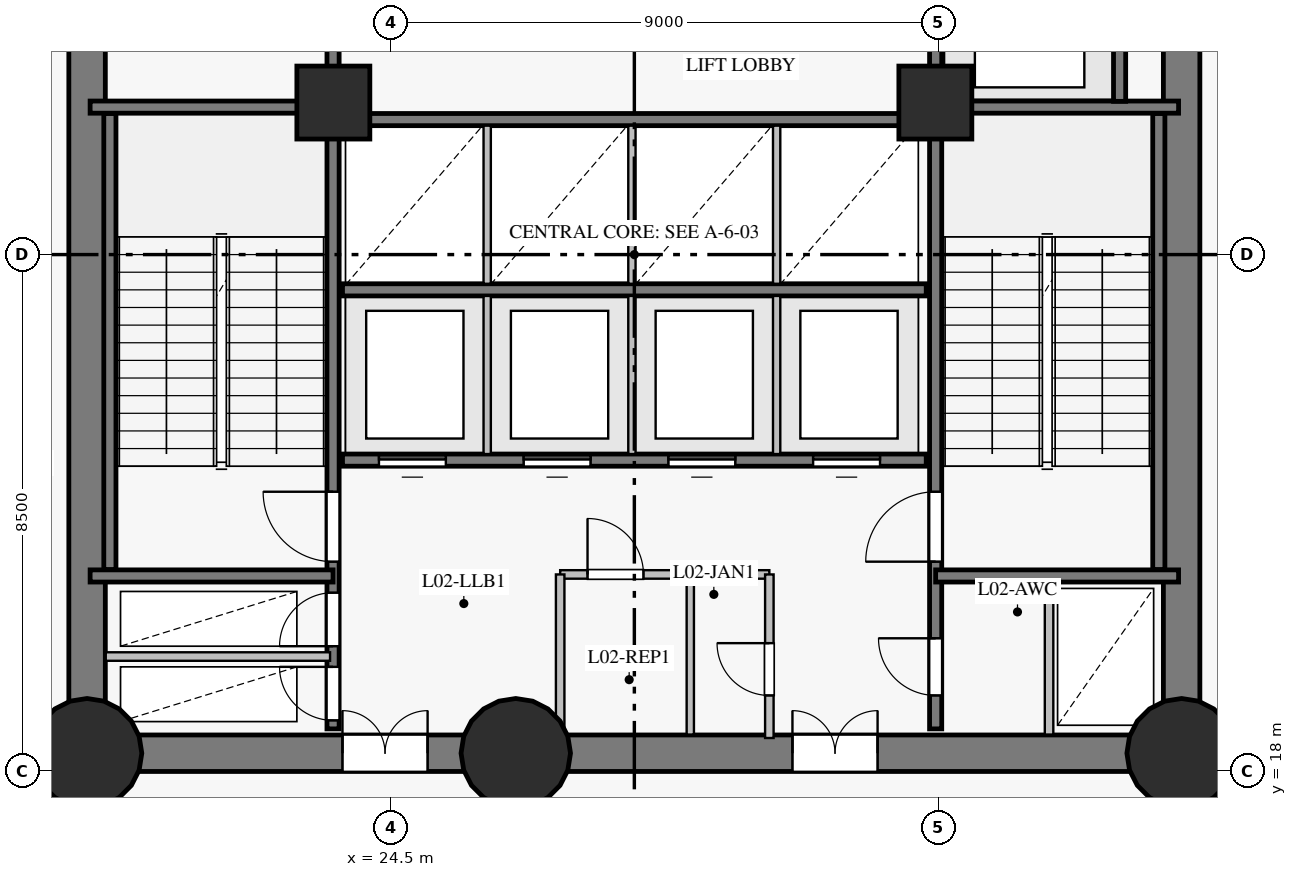
"""IFC4 building model, lengths in metres.
Left out: names, types, materials, properties, quantities, classifications, styles, units other than length and angle.
Written with IfcOpenShell. Run it as: python <this file> out.ifc"""

import sys

from ifc_helpers import new_model, si_unit, direction, frame, frame_2d, origin, origin_with_axes, origin_2d, place, context, subcontext, project, spatial, rectangle, circle, extrude, source, transform, mapped, element, fill, save


model = new_model("IFC4")
c1 = context("Model", 3, precision=1e-05, world=origin(), true_north=direction((0.0, 1.0)))
c2 = subcontext(c1, "Body", "Model", "MODEL_VIEW")
j1 = project(units=[si_unit("LENGTHUNIT", "METRE"), si_unit("PLANEANGLEUNIT", "RADIAN")], contexts=[c1])
p1 = place(None, origin())
s1 = spatial("IfcSite", under=j1, at=p1, CompositionType="ELEMENT")
p2 = place(p1, origin())
s2 = spatial("IfcBuilding", under=s1, at=p2, CompositionType="ELEMENT")
p3 = place(p2, frame((0.0, 0.0, 9.0)))
s3 = spatial("IfcBuildingStorey", under=s2, at=p3, CompositionType="ELEMENT", Elevation=9.0)
p4 = place(p3, frame((19.5, 18.3, 0.0), z_axis=(0.0, 0.0, 1.0), x_axis=(1.0, 0.0, 0.0)))
e1 = element("IfcWall", 1, at=p4, inside=s3, PredefinedType="SHEAR", context=c2, shape_type="SweptSolid", body=[
    extrude(rectangle(XDim=7.05, YDim=0.6, at=frame_2d((3.525, 0.0))), origin(), (0.0, 0.0, 1.0), 4.2),
])
p5 = place(p4, frame((4.2, 0.0, 0.0)))
e2 = element("IfcOpeningElement", 2, at=p5, cuts=e1, PredefinedType="OPENING", context=c2, shape_type="SweptSolid", body=[
    extrude(rectangle(XDim=1.4, YDim=2.2, at=frame_2d((0.7, 1.1))), frame((0.0, 0.31, 0.0), z_axis=(0.0, -1.0, 0.0), x_axis=(1.0, 0.0, 0.0)), (0.0, 0.0, 1.0), 0.62),
])
p6 = place(p3, frame((26.55, 18.3, 0.0), z_axis=(0.0, 0.0, 1.0), x_axis=(1.0, 0.0, 0.0)))
e3 = element("IfcWall", 3, at=p6, inside=s3, PredefinedType="SHEAR", context=c2, shape_type="SweptSolid", body=[
    extrude(rectangle(XDim=10.95, YDim=0.6, at=frame_2d((5.475, 0.0))), origin(), (0.0, 0.0, 1.0), 4.2),
])
p7 = place(p6, frame((4.55, 0.0, 0.0)))
e4 = element("IfcOpeningElement", 4, at=p7, cuts=e3, PredefinedType="OPENING", context=c2, shape_type="SweptSolid", body=[
    extrude(rectangle(XDim=1.4, YDim=2.2, at=frame_2d((0.7, 1.1))), frame((0.0, 0.31, 0.0), z_axis=(0.0, -1.0, 0.0), x_axis=(1.0, 0.0, 0.0)), (0.0, 0.0, 1.0), 0.62),
])
p8 = place(p3, frame((37.5, 18.3, 0.0), z_axis=(0.0, 0.0, 1.0), x_axis=(0.0, 1.0, 0.0)))
e5 = element("IfcWall", 5, at=p8, inside=s3, PredefinedType="SHEAR", context=c2, shape_type="SweptSolid", body=[
    extrude(rectangle(XDim=16.4, YDim=0.6, at=frame_2d((8.2, 0.0))), origin(), (0.0, 0.0, 1.0), 4.2),
])
p9 = place(p8, frame((13.96, 0.0, 0.0)))
e6 = element("IfcOpeningElement", 6, at=p9, cuts=e5, PredefinedType="OPENING", context=c2, shape_type="SweptSolid", body=[
    extrude(rectangle(XDim=1.2, YDim=2.15, at=frame_2d((0.6, 1.075))), frame((0.0, 0.31, 0.0), z_axis=(0.0, -1.0, 0.0), x_axis=(1.0, 0.0, 0.0)), (0.0, 0.0, 1.0), 0.62),
])
p10 = place(p3, frame((19.5, 34.7, 0.0), z_axis=(0.0, 0.0, 1.0), x_axis=(0.0, -1.0, 0.0)))
e7 = element("IfcWall", 7, at=p10, inside=s3, PredefinedType="SHEAR", context=c2, shape_type="SweptSolid", body=[
    extrude(rectangle(XDim=16.4, YDim=0.6, at=frame_2d((8.2, 0.0))), origin(), (0.0, 0.0, 1.0), 4.2),
])
p11 = place(p10, frame((3.1, 0.0, 0.0)))
e8 = element("IfcOpeningElement", 8, at=p11, cuts=e7, PredefinedType="OPENING", context=c2, shape_type="SweptSolid", body=[
    extrude(rectangle(XDim=1.1, YDim=2.15, at=frame_2d((0.55, 1.075))), frame((0.0, 0.31, 0.0), z_axis=(0.0, -1.0, 0.0), x_axis=(1.0, 0.0, 0.0)), (0.0, 0.0, 1.0), 0.62),
])
m1 = source(origin_with_axes(), c2, "Body", "SweptSolid", [
    extrude(circle(Radius=0.9, at=origin_2d()), origin(), (0.0, 0.0, 1.0), 4.5),
])
for number, where, z_axis, x_axis in (
    (9, (19.5, 18.3, 0.0), (0.0, 0.0, 1.0), (1.0, 0.0, 0.0)),
    (10, (26.55, 18.3, 0.0), (0.0, 0.0, 1.0), (1.0, 0.0, 0.0)),
    (11, (37.5, 18.3, 0.0), (0.0, 0.0, 1.0), (1.0, 0.0, 0.0)),
):
    element("IfcColumn", number, at=place(p3, frame(where, z_axis=z_axis, x_axis=x_axis)), inside=s3, PredefinedType="COLUMN", context=c2, shape_type="MappedRepresentation", body=[
        mapped(m1, transform((0.0, 0.0, 0.0), scale=1.0)),
    ])
m2 = source(origin_with_axes(), c2, "Body", "SweptSolid", [
    extrude(rectangle(XDim=1.2, YDim=1.2, at=origin_2d()), origin(), (0.0, 0.0, 1.0), 4.5),
])
for number, where, z_axis, x_axis in (
    (12, (23.55, 29.0, 0.0), (0.0, 0.0, 1.0), (1.0, 0.0, 0.0)),
    (13, (33.45, 29.0, 0.0), (0.0, 0.0, 1.0), (1.0, 0.0, 0.0)),
):
    element("IfcColumn", number, at=place(p3, frame(where, z_axis=z_axis, x_axis=x_axis)), inside=s3, PredefinedType="COLUMN", context=c2, shape_type="MappedRepresentation", body=[
        mapped(m2, transform((0.0, 0.0, 0.0), scale=1.0)),
    ])
p12 = place(p3, frame((23.545, 18.7, 0.0), z_axis=(0.0, 0.0, 1.0), x_axis=(0.0, 1.0, 0.0)))
e14 = element("IfcWall", 14, at=p12, inside=s3, PredefinedType="SHEAR", context=c2, shape_type="SweptSolid", body=[
    extrude(rectangle(XDim=15.6, YDim=0.2, at=frame_2d((7.8, 0.0))), origin(), (0.0, 0.0, 1.0), 4.2),
])
p13 = place(p12, frame((2.75, 0.0, 0.0)))
e15 = element("IfcOpeningElement", 15, at=p13, cuts=e14, PredefinedType="OPENING", context=c2, shape_type="SweptSolid", body=[
    extrude(rectangle(XDim=1.15, YDim=2.15, at=frame_2d((0.575, 1.075))), frame((0.0, 0.11, 0.0), z_axis=(0.0, -1.0, 0.0), x_axis=(1.0, 0.0, 0.0)), (0.0, 0.0, 1.0), 0.22),
])
p14 = place(p12, frame((0.14, 0.0, 0.0)))
e16 = element("IfcOpeningElement", 16, at=p14, cuts=e14, PredefinedType="OPENING", context=c2, shape_type="SweptSolid", body=[
    extrude(rectangle(XDim=0.88, YDim=2.1, at=frame_2d((0.44, 1.05))), frame((0.0, 0.11, 0.0), z_axis=(0.0, -1.0, 0.0), x_axis=(1.0, 0.0, 0.0)), (0.0, 0.0, 1.0), 0.22),
])
p15 = place(p12, frame((1.36, 0.0, 0.0)))
e17 = element("IfcOpeningElement", 17, at=p15, cuts=e14, PredefinedType="OPENING", context=c2, shape_type="SweptSolid", body=[
    extrude(rectangle(XDim=0.88, YDim=2.1, at=frame_2d((0.44, 1.05))), frame((0.0, 0.11, 0.0), z_axis=(0.0, -1.0, 0.0), x_axis=(1.0, 0.0, 0.0)), (0.0, 0.0, 1.0), 0.22),
])
p16 = place(p12, frame((12.1, 0.0, 0.0)))
e18 = element("IfcOpeningElement", 18, at=p16, cuts=e14, PredefinedType="OPENING", context=c2, shape_type="SweptSolid", body=[
    extrude(rectangle(XDim=1.12, YDim=2.15, at=frame_2d((0.56, 1.075))), frame((0.0, 0.11, 0.0), z_axis=(0.0, -1.0, 0.0), x_axis=(1.0, 0.0, 0.0)), (0.0, 0.0, 1.0), 0.22),
])
p17 = place(p12, frame((14.05, 0.0, 0.0)))
e19 = element("IfcOpeningElement", 19, at=p17, cuts=e14, PredefinedType="OPENING", context=c2, shape_type="SweptSolid", body=[
    extrude(rectangle(XDim=1.12, YDim=2.15, at=frame_2d((0.56, 1.075))), frame((0.0, 0.11, 0.0), z_axis=(0.0, -1.0, 0.0), x_axis=(1.0, 0.0, 0.0)), (0.0, 0.0, 1.0), 0.22),
])
p18 = place(p3, frame((33.455, 18.7, 0.0), z_axis=(0.0, 0.0, 1.0), x_axis=(0.0, 1.0, 0.0)))
e20 = element("IfcWall", 20, at=p18, inside=s3, PredefinedType="SHEAR", context=c2, shape_type="SweptSolid", body=[
    extrude(rectangle(XDim=15.6, YDim=0.2, at=frame_2d((7.8, 0.0))), origin(), (0.0, 0.0, 1.0), 4.2),
])
p19 = place(p18, frame((2.75, 0.0, 0.0)))
e21 = element("IfcOpeningElement", 21, at=p19, cuts=e20, PredefinedType="OPENING", context=c2, shape_type="SweptSolid", body=[
    extrude(rectangle(XDim=1.15, YDim=2.15, at=frame_2d((0.575, 1.075))), frame((0.0, 0.11, 0.0), z_axis=(0.0, -1.0, 0.0), x_axis=(1.0, 0.0, 0.0)), (0.0, 0.0, 1.0), 0.22),
])
p20 = place(p18, frame((0.55, 0.0, 0.0)))
e22 = element("IfcOpeningElement", 22, at=p20, cuts=e20, PredefinedType="OPENING", context=c2, shape_type="SweptSolid", body=[
    extrude(rectangle(XDim=0.94, YDim=2.1, at=frame_2d((0.47, 1.05))), frame((0.0, 0.11, 0.0), z_axis=(0.0, -1.0, 0.0), x_axis=(1.0, 0.0, 0.0)), (0.0, 0.0, 1.0), 0.22),
])
p21 = place(p3, frame((23.7, 23.12, 0.0), z_axis=(0.0, 0.0, 1.0), x_axis=(1.0, 0.0, 0.0)))
e23 = element("IfcWall", 23, at=p21, inside=s3, PredefinedType="SHEAR", context=c2, shape_type="SweptSolid", body=[
    extrude(rectangle(XDim=9.6, YDim=0.2, at=frame_2d((4.8, 0.0))), origin(), (0.0, 0.0, 1.0), 4.2),
])
p22 = place(p21, frame((0.6, 0.0, 0.0)))
e24 = element("IfcOpeningElement", 24, at=p22, cuts=e23, PredefinedType="OPENING", context=c2, shape_type="SweptSolid", body=[
    extrude(rectangle(XDim=1.1, YDim=2.15, at=frame_2d((0.55, 1.075))), frame((0.0, 0.11, 0.0), z_axis=(0.0, -1.0, 0.0), x_axis=(1.0, 0.0, 0.0)), (0.0, 0.0, 1.0), 0.22),
])
p23 = place(p21, frame((2.98, 0.0, 0.0)))
e25 = element("IfcOpeningElement", 25, at=p23, cuts=e23, PredefinedType="OPENING", context=c2, shape_type="SweptSolid", body=[
    extrude(rectangle(XDim=1.1, YDim=2.15, at=frame_2d((0.55, 1.075))), frame((0.0, 0.11, 0.0), z_axis=(0.0, -1.0, 0.0), x_axis=(1.0, 0.0, 0.0)), (0.0, 0.0, 1.0), 0.22),
])
p24 = place(p21, frame((5.36, 0.0, 0.0)))
e26 = element("IfcOpeningElement", 26, at=p24, cuts=e23, PredefinedType="OPENING", context=c2, shape_type="SweptSolid", body=[
    extrude(rectangle(XDim=1.1, YDim=2.15, at=frame_2d((0.55, 1.075))), frame((0.0, 0.11, 0.0), z_axis=(0.0, -1.0, 0.0), x_axis=(1.0, 0.0, 0.0)), (0.0, 0.0, 1.0), 0.22),
])
p25 = place(p21, frame((7.74, 0.0, 0.0)))
e27 = element("IfcOpeningElement", 27, at=p25, cuts=e23, PredefinedType="OPENING", context=c2, shape_type="SweptSolid", body=[
    extrude(rectangle(XDim=1.1, YDim=2.15, at=frame_2d((0.55, 1.075))), frame((0.0, 0.11, 0.0), z_axis=(0.0, -1.0, 0.0), x_axis=(1.0, 0.0, 0.0)), (0.0, 0.0, 1.0), 0.22),
])
for number, where, z_axis, x_axis in (
    (28, (23.7, 25.92, 0.0), (0.0, 0.0, 1.0), (1.0, 0.0, 0.0)),
    (29, (23.7, 28.72, 0.0), (0.0, 0.0, 1.0), (1.0, 0.0, 0.0)),
):
    element("IfcWall", number, at=place(p3, frame(where, z_axis=z_axis, x_axis=x_axis)), inside=s3, PredefinedType="SHEAR", context=c2, shape_type="SweptSolid", body=[
        extrude(rectangle(XDim=9.6, YDim=0.2, at=frame_2d((4.8, 0.0))), origin(), (0.0, 0.0, 1.0), 4.2),
    ])
for number, where, z_axis, x_axis in (
    (30, (19.875, 21.32, 0.0), (0.0, 0.0, 1.0), (0.0, 1.0, 0.0)),
    (31, (37.125, 21.32, 0.0), (0.0, 0.0, 1.0), (0.0, 1.0, 0.0)),
):
    element("IfcWall", number, at=place(p3, frame(where, z_axis=z_axis, x_axis=x_axis)), inside=s3, PredefinedType="SHEAR", context=c2, shape_type="SweptSolid", body=[
        extrude(rectangle(XDim=7.5, YDim=0.2, at=frame_2d((3.75, 0.0))), origin(), (0.0, 0.0, 1.0), 4.2),
    ])
for number, where, z_axis, x_axis in (
    (32, (33.455, 21.215, 0.0), (0.0, 0.0, 1.0), (1.0, 0.0, 0.0)),
    (33, (33.455, 28.925, 0.0), (0.0, 0.0, 1.0), (1.0, 0.0, 0.0)),
    (34, (19.55, 21.215, 0.0), (0.0, 0.0, 1.0), (1.0, 0.0, 0.0)),
    (35, (19.55, 28.925, 0.0), (0.0, 0.0, 1.0), (1.0, 0.0, 0.0)),
):
    element("IfcWall", number, at=place(p3, frame(where, z_axis=z_axis, x_axis=x_axis)), inside=s3, PredefinedType="SHEAR", context=c2, shape_type="SweptSolid", body=[
        extrude(rectangle(XDim=3.995, YDim=0.2, at=frame_2d((1.998, 0.0))), origin(), (0.0, 0.0, 1.0), 4.2),
    ])
p26 = place(p3, frame((36.48, 29.02, 0.0), z_axis=(0.0, 0.0, 1.0), x_axis=(0.0, 1.0, 0.0)))
e36 = element("IfcWall", 36, at=p26, inside=s3, PredefinedType="SHEAR", context=c2, shape_type="SweptSolid", body=[
    extrude(rectangle(XDim=2.86, YDim=0.2, at=frame_2d((1.43, 0.0))), origin(), (0.0, 0.0, 1.0), 4.2),
])
p27 = place(p3, frame((19.807, 19.89, 0.0), z_axis=(0.0, 0.0, 1.0), x_axis=(1.0, 0.0, 0.0)))
e37 = element("IfcWall", 37, at=p27, inside=s3, PredefinedType="PARTITIONING", context=c2, shape_type="SweptSolid", body=[
    extrude(rectangle(XDim=3.689, YDim=0.14, at=frame_2d((1.844, 0.0))), origin(), (0.0, 0.0, 1.0), 4.2),
])
p28 = place(p3, frame((27.28, 21.24, 0.0), z_axis=(0.0, 0.0, 1.0), x_axis=(1.0, 0.0, 0.0)))
e38 = element("IfcWall", 38, at=p28, inside=s3, PredefinedType="PARTITIONING", context=c2, shape_type="SweptSolid", body=[
    extrude(rectangle(XDim=3.44, YDim=0.14, at=frame_2d((1.72, 0.0))), origin(), (0.0, 0.0, 1.0), 4.2),
])
p29 = place(p28, frame((0.45, 0.0, 0.0)))
e39 = element("IfcOpeningElement", 39, at=p29, cuts=e38, PredefinedType="OPENING", context=c2, shape_type="SweptSolid", body=[
    extrude(rectangle(XDim=0.92, YDim=2.1, at=frame_2d((0.46, 1.05))), frame((0.0, 0.08, 0.0), z_axis=(0.0, -1.0, 0.0), x_axis=(1.0, 0.0, 0.0)), (0.0, 0.0, 1.0), 0.16),
])
p30 = place(p3, frame((27.28, 18.55, 0.0), z_axis=(0.0, 0.0, 1.0), x_axis=(0.0, 1.0, 0.0)))
e40 = element("IfcWall", 40, at=p30, inside=s3, PredefinedType="PARTITIONING", context=c2, shape_type="SweptSolid", body=[
    extrude(rectangle(XDim=2.69, YDim=0.14, at=frame_2d((1.345, 0.0))), origin(), (0.0, 0.0, 1.0), 4.2),
])
p31 = place(p3, frame((30.72, 18.55, 0.0), z_axis=(0.0, 0.0, 1.0), x_axis=(0.0, 1.0, 0.0)))
e41 = element("IfcWall", 41, at=p31, inside=s3, PredefinedType="PARTITIONING", context=c2, shape_type="SweptSolid", body=[
    extrude(rectangle(XDim=2.69, YDim=0.14, at=frame_2d((1.345, 0.0))), origin(), (0.0, 0.0, 1.0), 4.2),
])
p32 = place(p31, frame((0.7, 0.0, 0.0)))
e42 = element("IfcOpeningElement", 42, at=p32, cuts=e41, PredefinedType="OPENING", context=c2, shape_type="SweptSolid", body=[
    extrude(rectangle(XDim=0.86, YDim=2.1, at=frame_2d((0.43, 1.05))), frame((0.0, 0.08, 0.0), z_axis=(0.0, -1.0, 0.0), x_axis=(1.0, 0.0, 0.0)), (0.0, 0.0, 1.0), 0.16),
])
for number, where, z_axis, x_axis in (
    (43, (26.08, 23.22, 0.0), (0.0, 0.0, 1.0), (0.0, 1.0, 0.0)),
    (44, (28.46, 23.22, 0.0), (0.0, 0.0, 1.0), (0.0, 1.0, 0.0)),
    (45, (30.84, 23.22, 0.0), (0.0, 0.0, 1.0), (0.0, 1.0, 0.0)),
    (46, (26.08, 26.02, 0.0), (0.0, 0.0, 1.0), (0.0, 1.0, 0.0)),
    (47, (28.46, 26.02, 0.0), (0.0, 0.0, 1.0), (0.0, 1.0, 0.0)),
    (48, (30.84, 26.02, 0.0), (0.0, 0.0, 1.0), (0.0, 1.0, 0.0)),
):
    element("IfcWall", number, at=place(p3, frame(where, z_axis=z_axis, x_axis=x_axis)), inside=s3, PredefinedType="PARTITIONING", context=c2, shape_type="SweptSolid", body=[
        extrude(rectangle(XDim=2.6, YDim=0.12, at=frame_2d((1.3, 0.0))), origin(), (0.0, 0.0, 1.0), 4.2),
    ])
p33 = place(p3, frame((29.42, 18.607, 0.0), z_axis=(0.0, 0.0, 1.0), x_axis=(0.0, 1.0, 0.0)))
e49 = element("IfcWall", 49, at=p33, inside=s3, PredefinedType="PARTITIONING", context=c2, shape_type="SweptSolid", body=[
    extrude(rectangle(XDim=2.56, YDim=0.12, at=frame_2d((1.28, 0.0))), origin(), (0.0, 0.0, 1.0), 4.2),
])
p34 = place(p3, frame((35.32, 18.607, 0.0), z_axis=(0.0, 0.0, 1.0), x_axis=(0.0, 1.0, 0.0)))
e50 = element("IfcWall", 50, at=p34, inside=s3, PredefinedType="PARTITIONING", context=c2, shape_type="SweptSolid", body=[
    extrude(rectangle(XDim=2.503, YDim=0.14, at=frame_2d((1.251, 0.0))), origin(), (0.0, 0.0, 1.0), 4.2),
])
m3 = source(origin_with_axes(), c2, "Body", "SweptSolid", [
    extrude(rectangle(XDim=1.15, YDim=2.15, at=frame_2d((0.575, 1.075))), frame((0.0, 0.025, 0.0), z_axis=(0.0, -1.0, 0.0), x_axis=(1.0, 0.0, 0.0)), (0.0, 0.0, 1.0), 0.05),
])
p35 = place(p13, origin())
e51 = element("IfcDoor", 51, at=p35, inside=s3, OperationType="SINGLE_SWING_RIGHT", PredefinedType="DOOR", context=c2, shape_type="MappedRepresentation", body=[
    mapped(m3, transform((0.0, 0.0, 0.0), scale=1.0)),
])
fill(e15, e51)
p36 = place(p19, origin())
e52 = element("IfcDoor", 52, at=p36, inside=s3, OperationType="SINGLE_SWING_LEFT", PredefinedType="DOOR", context=c2, shape_type="MappedRepresentation", body=[
    mapped(m3, transform((0.0, 0.0, 0.0), scale=1.0)),
])
fill(e21, e52)
m4 = source(origin_with_axes(), c2, "Body", "SweptSolid", [
    extrude(rectangle(XDim=0.88, YDim=2.1, at=frame_2d((0.44, 1.05))), frame((0.0, 0.025, 0.0), z_axis=(0.0, -1.0, 0.0), x_axis=(1.0, 0.0, 0.0)), (0.0, 0.0, 1.0), 0.05),
])
p37 = place(p14, origin())
e53 = element("IfcDoor", 53, at=p37, inside=s3, OperationType="SINGLE_SWING_RIGHT", PredefinedType="DOOR", context=c2, shape_type="MappedRepresentation", body=[
    mapped(m4, transform((0.0, 0.0, 0.0), scale=1.0)),
])
fill(e16, e53)
p38 = place(p15, origin())
e54 = element("IfcDoor", 54, at=p38, inside=s3, OperationType="SINGLE_SWING_LEFT", PredefinedType="DOOR", context=c2, shape_type="MappedRepresentation", body=[
    mapped(m4, transform((0.0, 0.0, 0.0), scale=1.0)),
])
fill(e17, e54)
m5 = source(origin_with_axes(), c2, "Body", "SweptSolid", [
    extrude(rectangle(XDim=1.4, YDim=2.2, at=frame_2d((0.7, 1.1))), frame((0.0, 0.025, 0.0), z_axis=(0.0, -1.0, 0.0), x_axis=(1.0, 0.0, 0.0)), (0.0, 0.0, 1.0), 0.05),
])
p39 = place(p5, origin())
e55 = element("IfcDoor", 55, at=p39, inside=s3, OperationType="DOUBLE_DOOR_SINGLE_SWING", PredefinedType="DOOR", context=c2, shape_type="MappedRepresentation", body=[
    mapped(m5, transform((0.0, 0.0, 0.0), scale=1.0)),
])
fill(e2, e55)
p40 = place(p7, origin())
e56 = element("IfcDoor", 56, at=p40, inside=s3, OperationType="DOUBLE_DOOR_SINGLE_SWING", PredefinedType="DOOR", context=c2, shape_type="MappedRepresentation", body=[
    mapped(m5, transform((0.0, 0.0, 0.0), scale=1.0)),
])
fill(e4, e56)
m6 = source(origin_with_axes(), c2, "Body", "SweptSolid", [
    extrude(rectangle(XDim=0.94, YDim=2.1, at=frame_2d((0.47, 1.05))), frame((0.0, 0.025, 0.0), z_axis=(0.0, -1.0, 0.0), x_axis=(1.0, 0.0, 0.0)), (0.0, 0.0, 1.0), 0.05),
])
p41 = place(p20, origin())
e57 = element("IfcDoor", 57, at=p41, inside=s3, OperationType="SINGLE_SWING_RIGHT", PredefinedType="DOOR", context=c2, shape_type="MappedRepresentation", body=[
    mapped(m6, transform((0.0, 0.0, 0.0), scale=1.0)),
])
fill(e22, e57)
m7 = source(origin_with_axes(), c2, "Body", "SweptSolid", [
    extrude(rectangle(XDim=0.92, YDim=2.1, at=frame_2d((0.46, 1.05))), frame((0.0, 0.025, 0.0), z_axis=(0.0, -1.0, 0.0), x_axis=(1.0, 0.0, 0.0)), (0.0, 0.0, 1.0), 0.05),
])
p42 = place(p29, origin())
e58 = element("IfcDoor", 58, at=p42, inside=s3, OperationType="SINGLE_SWING_LEFT", PredefinedType="DOOR", context=c2, shape_type="MappedRepresentation", body=[
    mapped(m7, transform((0.0, 0.0, 0.0), scale=1.0)),
])
fill(e39, e58)
m8 = source(origin_with_axes(), c2, "Body", "SweptSolid", [
    extrude(rectangle(XDim=0.86, YDim=2.1, at=frame_2d((0.43, 1.05))), frame((0.0, 0.025, 0.0), z_axis=(0.0, -1.0, 0.0), x_axis=(1.0, 0.0, 0.0)), (0.0, 0.0, 1.0), 0.05),
])
p43 = place(p32, origin())
e59 = element("IfcDoor", 59, at=p43, inside=s3, OperationType="SINGLE_SWING_RIGHT", PredefinedType="DOOR", context=c2, shape_type="MappedRepresentation", body=[
    mapped(m8, transform((0.0, 0.0, 0.0), scale=1.0)),
])
fill(e42, e59)
m9 = source(origin_with_axes(), c2, "Body", "SweptSolid", [
    extrude(rectangle(XDim=1.1, YDim=2.15, at=frame_2d((0.55, 1.075))), frame((0.0, 0.025, 0.0), z_axis=(0.0, -1.0, 0.0), x_axis=(1.0, 0.0, 0.0)), (0.0, 0.0, 1.0), 0.05),
])
p44 = place(p22, origin())
e60 = element("IfcDoor", 60, at=p44, inside=s3, OperationType="SLIDING_TO_LEFT", PredefinedType="DOOR", context=c2, shape_type="MappedRepresentation", body=[
    mapped(m9, transform((0.0, 0.0, 0.0), scale=1.0)),
])
fill(e24, e60)
p45 = place(p23, origin())
e61 = element("IfcDoor", 61, at=p45, inside=s3, OperationType="SLIDING_TO_RIGHT", PredefinedType="DOOR", context=c2, shape_type="MappedRepresentation", body=[
    mapped(m9, transform((0.0, 0.0, 0.0), scale=1.0)),
])
fill(e25, e61)
p46 = place(p24, origin())
e62 = element("IfcDoor", 62, at=p46, inside=s3, OperationType="SLIDING_TO_LEFT", PredefinedType="DOOR", context=c2, shape_type="MappedRepresentation", body=[
    mapped(m9, transform((0.0, 0.0, 0.0), scale=1.0)),
])
fill(e26, e62)
p47 = place(p25, origin())
e63 = element("IfcDoor", 63, at=p47, inside=s3, OperationType="SLIDING_TO_RIGHT", PredefinedType="DOOR", context=c2, shape_type="MappedRepresentation", body=[
    mapped(m9, transform((0.0, 0.0, 0.0), scale=1.0)),
])
fill(e27, e63)
save(model, sys.argv[1])
